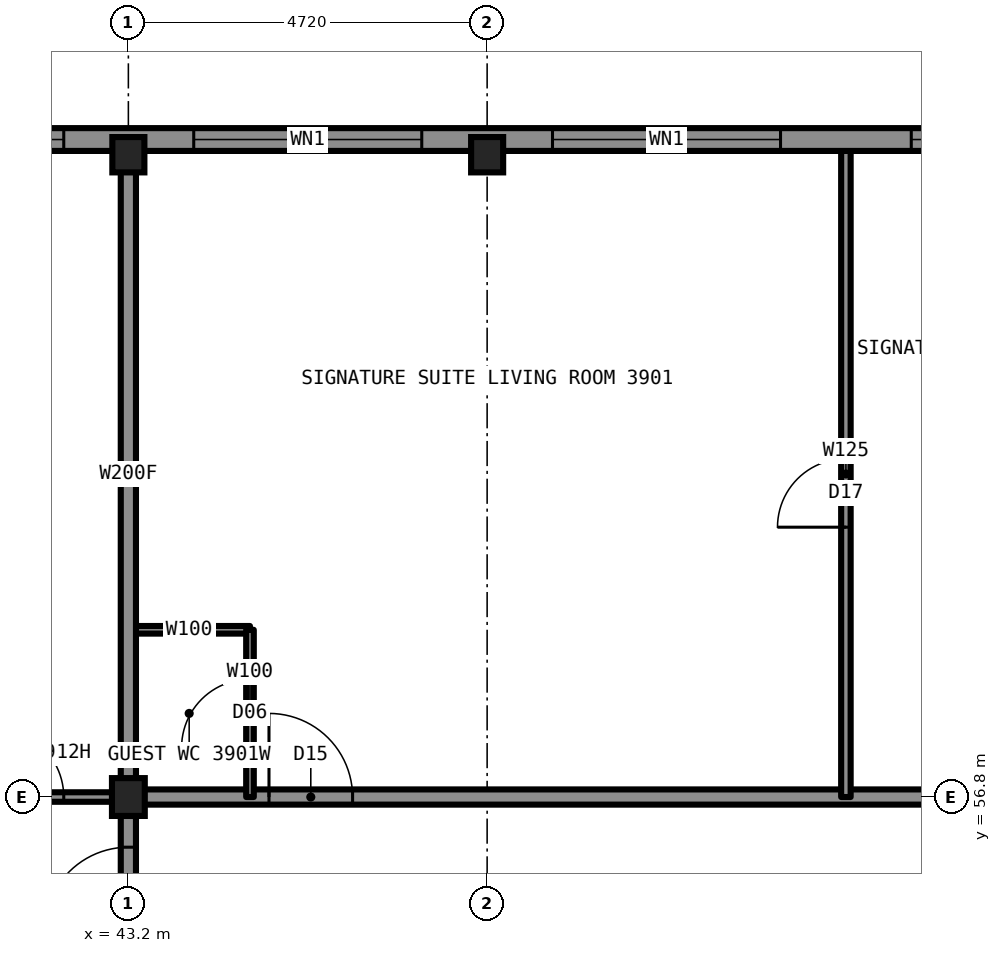
"""IFC4 building model, lengths in metres.
Left out: names, types, materials, properties, quantities, classifications, styles, units other than length and angle.
Written with IfcOpenShell. Run it as: python <this file> out.ifc"""

import sys

from ifc_helpers import new_model, si_unit, direction, frame, frame_2d, origin, origin_2d, place, context, subcontext, project, spatial, rectangle, i_section, extrude, element, fill, save


model = new_model("IFC4")
c1 = context("Model", 3, precision=1e-05, world=origin(), true_north=direction((0.0, 1.0)))
c2 = subcontext(c1, "Body", "Model", "MODEL_VIEW")
j1 = project(units=[si_unit("LENGTHUNIT", "METRE"), si_unit("PLANEANGLEUNIT", "RADIAN")], contexts=[c1])
p1 = place(None, origin())
s1 = spatial("IfcSite", under=j1, at=p1, CompositionType="ELEMENT")
p2 = place(p1, origin())
s2 = spatial("IfcBuilding", under=s1, at=p2, CompositionType="ELEMENT")
p3 = place(p2, frame((0.0, 0.0, 145.9)))
s3 = spatial("IfcBuildingStorey", under=s2, at=p3, CompositionType="ELEMENT", Elevation=145.9)
for number, where, z_axis, x_axis in (
    (1, (43.2, 65.25, 0.0), (0.0, 0.0, 1.0), (1.0, 0.0, 0.0)),
    (2, (47.92, 65.25, 0.0), (0.0, 0.0, 1.0), (1.0, 0.0, 0.0)),
):
    element("IfcColumn", number, at=place(p3, frame(where, z_axis=z_axis, x_axis=x_axis)), inside=s3, PredefinedType="COLUMN", context=c2, shape_type="SweptSolid", body=[
        extrude(i_section(OverallWidth=0.422, OverallDepth=0.465, WebThickness=0.045, FlangeThickness=0.073, at=origin_2d()), origin(), (0.0, 0.0, 1.0), 3.5),
    ])
p4 = place(p3, frame((43.2, 56.8, 0.0), z_axis=(0.0, 0.0, 1.0), x_axis=(1.0, 0.0, 0.0)))
e3 = element("IfcColumn", 3, at=p4, inside=s3, PredefinedType="COLUMN", context=c2, shape_type="SweptSolid", body=[
    extrude(i_section(OverallWidth=0.432, OverallDepth=0.498, WebThickness=0.056, FlangeThickness=0.089, at=origin_2d()), origin(), (0.0, 0.0, 1.0), 3.5),
])
p5 = place(p3, frame((43.2, 56.8, 0.0), z_axis=(0.0, 0.0, 1.0), x_axis=(1.0, 0.0, 0.0)))
e4 = element("IfcWall", 4, at=p5, inside=s3, PredefinedType="PARTITIONING", context=c2, shape_type="SweptSolid", body=[
    extrude(rectangle(XDim=23.6, YDim=0.2, at=frame_2d((11.8, 0.0))), origin(), (0.0, 0.0, 1.0), 3.33),
])
p6 = place(p5, frame((1.85, 0.0, 0.0)))
e5 = element("IfcOpeningElement", 5, at=p6, cuts=e4, PredefinedType="OPENING", context=c2, shape_type="SweptSolid", body=[
    extrude(rectangle(XDim=1.1, YDim=2.2, at=frame_2d((0.55, 1.1))), frame((0.0, 0.11, 0.0), z_axis=(0.0, -1.0, 0.0), x_axis=(1.0, 0.0, 0.0)), (0.0, 0.0, 1.0), 0.22),
])
p7 = place(p5, frame((17.16, 0.0, 0.0)))
e6 = element("IfcOpeningElement", 6, at=p7, cuts=e4, PredefinedType="OPENING", context=c2, shape_type="SweptSolid", body=[
    extrude(rectangle(XDim=1.0, YDim=2.2, at=frame_2d((0.5, 1.1))), frame((0.0, 0.11, 0.0), z_axis=(0.0, -1.0, 0.0), x_axis=(1.0, 0.0, 0.0)), (0.0, 0.0, 1.0), 0.22),
])
p8 = place(p3, frame((34.7, 56.8, 0.0), z_axis=(0.0, 0.0, 1.0), x_axis=(1.0, 0.0, 0.0)))
e7 = element("IfcWall", 7, at=p8, inside=s3, PredefinedType="PARTITIONING", context=c2, shape_type="SweptSolid", body=[
    extrude(rectangle(XDim=8.5, YDim=0.125, at=frame_2d((4.25, 0.0))), origin(), (0.0, 0.0, 1.0), 2.573),
])
p9 = place(p8, frame((6.75, 0.0, 0.0)))
e8 = element("IfcOpeningElement", 8, at=p9, cuts=e7, PredefinedType="OPENING", context=c2, shape_type="SweptSolid", body=[
    extrude(rectangle(XDim=0.9, YDim=2.2, at=frame_2d((0.45, 1.1))), frame((0.0, 0.073, 0.0), z_axis=(0.0, -1.0, 0.0), x_axis=(1.0, 0.0, 0.0)), (0.0, 0.0, 1.0), 0.145),
])
p10 = place(p3, frame((43.2, 59.0, 0.0), z_axis=(0.0, 0.0, 1.0), x_axis=(1.0, 0.0, 0.0)))
e9 = element("IfcWall", 9, at=p10, inside=s3, PredefinedType="PARTITIONING", context=c2, shape_type="SweptSolid", body=[
    extrude(rectangle(XDim=1.6, YDim=0.1, at=frame_2d((0.8, 0.0))), origin(), (0.0, 0.0, 1.0), 3.33),
])
p11 = place(p3, frame((44.8, 56.8, 0.0), z_axis=(0.0, 0.0, 1.0), x_axis=(0.0, 1.0, 0.0)))
e10 = element("IfcWall", 10, at=p11, inside=s3, PredefinedType="PARTITIONING", context=c2, shape_type="SweptSolid", body=[
    extrude(rectangle(XDim=2.2, YDim=0.1, at=frame_2d((1.1, 0.0))), origin(), (0.0, 0.0, 1.0), 3.33),
])
p12 = place(p11, frame((0.65, 0.0, 0.0)))
e11 = element("IfcOpeningElement", 11, at=p12, cuts=e10, PredefinedType="OPENING", context=c2, shape_type="SweptSolid", body=[
    extrude(rectangle(XDim=0.9, YDim=2.1, at=frame_2d((0.45, 1.05))), frame((0.0, 0.06, 0.0), z_axis=(0.0, -1.0, 0.0), x_axis=(1.0, 0.0, 0.0)), (0.0, 0.0, 1.0), 0.12),
])
p13 = place(p3, frame((43.2, 52.08, 0.0), z_axis=(0.0, 0.0, 1.0), x_axis=(0.0, 1.0, 0.0)))
e12 = element("IfcWall", 12, at=p13, inside=s3, PredefinedType="PARTITIONING", context=c2, shape_type="SweptSolid", body=[
    extrude(rectangle(XDim=4.72, YDim=0.2, at=frame_2d((2.36, 0.0))), origin(), (0.0, 0.0, 1.0), 3.33),
])
p14 = place(p13, frame((2.96, 0.0, 0.0)))
e13 = element("IfcOpeningElement", 13, at=p14, cuts=e12, PredefinedType="OPENING", context=c2, shape_type="SweptSolid", body=[
    extrude(rectangle(XDim=1.1, YDim=2.2, at=frame_2d((0.55, 1.1))), frame((0.0, 0.11, 0.0), z_axis=(0.0, -1.0, 0.0), x_axis=(1.0, 0.0, 0.0)), (0.0, 0.0, 1.0), 0.22),
])
p15 = place(p3, frame((43.2, 56.8, 0.0), z_axis=(0.0, 0.0, 1.0), x_axis=(0.0, 1.0, 0.0)))
e14 = element("IfcWall", 14, at=p15, inside=s3, PredefinedType="PARTITIONING", context=c2, shape_type="SweptSolid", body=[
    extrude(rectangle(XDim=8.5, YDim=0.2, at=frame_2d((4.25, 0.0))), origin(), (0.0, 0.0, 1.0), 2.573),
])
p16 = place(p3, frame((52.64, 56.8, 0.0), z_axis=(0.0, 0.0, 1.0), x_axis=(0.0, 1.0, 0.0)))
e15 = element("IfcWall", 15, at=p16, inside=s3, PredefinedType="PARTITIONING", context=c2, shape_type="SweptSolid", body=[
    extrude(rectangle(XDim=8.5, YDim=0.125, at=frame_2d((4.25, 0.0))), origin(), (0.0, 0.0, 1.0), 3.33),
])
p17 = place(p16, frame((3.55, 0.0, 0.0)))
e16 = element("IfcOpeningElement", 16, at=p17, cuts=e15, PredefinedType="OPENING", context=c2, shape_type="SweptSolid", body=[
    extrude(rectangle(XDim=0.9, YDim=2.2, at=frame_2d((0.45, 1.1))), frame((0.0, 0.073, 0.0), z_axis=(0.0, -1.0, 0.0), x_axis=(1.0, 0.0, 0.0)), (0.0, 0.0, 1.0), 0.145),
])
p18 = place(p3, frame((70.1, 65.45, 0.0), z_axis=(0.0, 0.0, 1.0), x_axis=(-1.0, 0.0, 0.0)))
e17 = element("IfcWall", 17, at=p18, inside=s3, PredefinedType="SOLIDWALL", context=c2, shape_type="SweptSolid", body=[
    extrude(rectangle(XDim=30.2, YDim=0.3, at=frame_2d((15.1, 0.0))), origin(), (0.0, 0.0, 1.0), 2.83),
])
p19 = place(p18, frame((1.3, 0.0, 0.8)))
e18 = element("IfcOpeningElement", 18, at=p19, cuts=e17, PredefinedType="OPENING", context=c2, shape_type="SweptSolid", body=[
    extrude(rectangle(XDim=1.1, YDim=1.7, at=frame_2d((0.55, 0.85))), frame((0.0, 0.16, 0.0), z_axis=(0.0, -1.0, 0.0), x_axis=(1.0, 0.0, 0.0)), (0.0, 0.0, 1.0), 0.32),
])
p20 = place(p18, frame((4.16, 0.0, 0.5)))
e19 = element("IfcOpeningElement", 19, at=p20, cuts=e17, PredefinedType="OPENING", context=c2, shape_type="SweptSolid", body=[
    extrude(rectangle(XDim=3.0, YDim=2.0, at=frame_2d((1.5, 1.0))), frame((0.0, 0.16, 0.0), z_axis=(0.0, -1.0, 0.0), x_axis=(1.0, 0.0, 0.0)), (0.0, 0.0, 1.0), 0.32),
])
p21 = place(p18, frame((8.88, 0.0, 0.5)))
e20 = element("IfcOpeningElement", 20, at=p21, cuts=e17, PredefinedType="OPENING", context=c2, shape_type="SweptSolid", body=[
    extrude(rectangle(XDim=3.0, YDim=2.0, at=frame_2d((1.5, 1.0))), frame((0.0, 0.16, 0.0), z_axis=(0.0, -1.0, 0.0), x_axis=(1.0, 0.0, 0.0)), (0.0, 0.0, 1.0), 0.32),
])
p22 = place(p18, frame((13.6, 0.0, 0.5)))
e21 = element("IfcOpeningElement", 21, at=p22, cuts=e17, PredefinedType="OPENING", context=c2, shape_type="SweptSolid", body=[
    extrude(rectangle(XDim=3.0, YDim=2.0, at=frame_2d((1.5, 1.0))), frame((0.0, 0.16, 0.0), z_axis=(0.0, -1.0, 0.0), x_axis=(1.0, 0.0, 0.0)), (0.0, 0.0, 1.0), 0.32),
])
p23 = place(p18, frame((18.32, 0.0, 0.5)))
e22 = element("IfcOpeningElement", 22, at=p23, cuts=e17, PredefinedType="OPENING", context=c2, shape_type="SweptSolid", body=[
    extrude(rectangle(XDim=3.0, YDim=2.0, at=frame_2d((1.5, 1.0))), frame((0.0, 0.16, 0.0), z_axis=(0.0, -1.0, 0.0), x_axis=(1.0, 0.0, 0.0)), (0.0, 0.0, 1.0), 0.32),
])
p24 = place(p18, frame((23.04, 0.0, 0.5)))
e23 = element("IfcOpeningElement", 23, at=p24, cuts=e17, PredefinedType="OPENING", context=c2, shape_type="SweptSolid", body=[
    extrude(rectangle(XDim=3.0, YDim=2.0, at=frame_2d((1.5, 1.0))), frame((0.0, 0.16, 0.0), z_axis=(0.0, -1.0, 0.0), x_axis=(1.0, 0.0, 0.0)), (0.0, 0.0, 1.0), 0.32),
])
p25 = place(p18, frame((27.75, 0.0, 0.8)))
e24 = element("IfcOpeningElement", 24, at=p25, cuts=e17, PredefinedType="OPENING", context=c2, shape_type="SweptSolid", body=[
    extrude(rectangle(XDim=1.1, YDim=1.7, at=frame_2d((0.55, 0.85))), frame((0.0, 0.16, 0.0), z_axis=(0.0, -1.0, 0.0), x_axis=(1.0, 0.0, 0.0)), (0.0, 0.0, 1.0), 0.32),
])
p26 = place(p6, origin())
e25 = element("IfcDoor", 25, at=p26, inside=s3, OperationType="SINGLE_SWING_LEFT", PredefinedType="DOOR", context=c2, shape_type="SweptSolid", body=[
    extrude(rectangle(XDim=1.1, YDim=2.2, at=frame_2d((0.55, 1.1))), frame((0.0, 0.025, 0.0), z_axis=(0.0, -1.0, 0.0), x_axis=(1.0, 0.0, 0.0)), (0.0, 0.0, 1.0), 0.05),
])
fill(e5, e25)
p27 = place(p17, origin())
e26 = element("IfcDoor", 26, at=p27, inside=s3, OperationType="SINGLE_SWING_LEFT", PredefinedType="DOOR", context=c2, shape_type="SweptSolid", body=[
    extrude(rectangle(XDim=0.9, YDim=2.2, at=frame_2d((0.45, 1.1))), frame((0.0, 0.025, 0.0), z_axis=(0.0, -1.0, 0.0), x_axis=(1.0, 0.0, 0.0)), (0.0, 0.0, 1.0), 0.05),
])
fill(e16, e26)
p28 = place(p12, origin())
e27 = element("IfcDoor", 27, at=p28, inside=s3, OperationType="SINGLE_SWING_LEFT", PredefinedType="DOOR", context=c2, shape_type="SweptSolid", body=[
    extrude(rectangle(XDim=0.9, YDim=2.1, at=frame_2d((0.45, 1.05))), frame((0.0, 0.025, 0.0), z_axis=(0.0, -1.0, 0.0), x_axis=(1.0, 0.0, 0.0)), (0.0, 0.0, 1.0), 0.05),
])
fill(e11, e27)
p29 = place(p9, origin())
e28 = element("IfcDoor", 28, at=p29, inside=s3, OperationType="SINGLE_SWING_LEFT", PredefinedType="DOOR", context=c2, shape_type="SweptSolid", body=[
    extrude(rectangle(XDim=0.9, YDim=2.2, at=frame_2d((0.45, 1.1))), frame((0.0, 0.025, 0.0), z_axis=(0.0, -1.0, 0.0), x_axis=(1.0, 0.0, 0.0)), (0.0, 0.0, 1.0), 0.05),
])
fill(e8, e28)
p30 = place(p14, origin())
e29 = element("IfcDoor", 29, at=p30, inside=s3, OperationType="SINGLE_SWING_LEFT", PredefinedType="DOOR", context=c2, shape_type="SweptSolid", body=[
    extrude(rectangle(XDim=1.1, YDim=2.2, at=frame_2d((0.55, 1.1))), frame((0.0, 0.025, 0.0), z_axis=(0.0, -1.0, 0.0), x_axis=(1.0, 0.0, 0.0)), (0.0, 0.0, 1.0), 0.05),
])
fill(e13, e29)
p31 = place(p22, origin())
e30 = element("IfcWindow", 30, at=p31, inside=s3, PartitioningType="SINGLE_PANEL", PredefinedType="WINDOW", context=c2, shape_type="SweptSolid", body=[
    extrude(rectangle(XDim=3.0, YDim=2.0, at=frame_2d((1.5, 1.0))), frame((0.0, 0.03, 0.0), z_axis=(0.0, -1.0, 0.0), x_axis=(1.0, 0.0, 0.0)), (0.0, 0.0, 1.0), 0.06),
])
fill(e21, e30)
p32 = place(p23, origin())
e31 = element("IfcWindow", 31, at=p32, inside=s3, PartitioningType="SINGLE_PANEL", PredefinedType="WINDOW", context=c2, shape_type="SweptSolid", body=[
    extrude(rectangle(XDim=3.0, YDim=2.0, at=frame_2d((1.5, 1.0))), frame((0.0, 0.03, 0.0), z_axis=(0.0, -1.0, 0.0), x_axis=(1.0, 0.0, 0.0)), (0.0, 0.0, 1.0), 0.06),
])
fill(e22, e31)
p33 = place(p24, origin())
e32 = element("IfcWindow", 32, at=p33, inside=s3, PartitioningType="SINGLE_PANEL", PredefinedType="WINDOW", context=c2, shape_type="SweptSolid", body=[
    extrude(rectangle(XDim=3.0, YDim=2.0, at=frame_2d((1.5, 1.0))), frame((0.0, 0.03, 0.0), z_axis=(0.0, -1.0, 0.0), x_axis=(1.0, 0.0, 0.0)), (0.0, 0.0, 1.0), 0.06),
])
fill(e23, e32)
p34 = place(p25, origin())
e33 = element("IfcWindow", 33, at=p34, inside=s3, PartitioningType="SINGLE_PANEL", PredefinedType="WINDOW", context=c2, shape_type="SweptSolid", body=[
    extrude(rectangle(XDim=1.1, YDim=1.7, at=frame_2d((0.55, 0.85))), frame((0.0, 0.03, 0.0), z_axis=(0.0, -1.0, 0.0), x_axis=(1.0, 0.0, 0.0)), (0.0, 0.0, 1.0), 0.06),
])
fill(e24, e33)
save(model, sys.argv[1])
